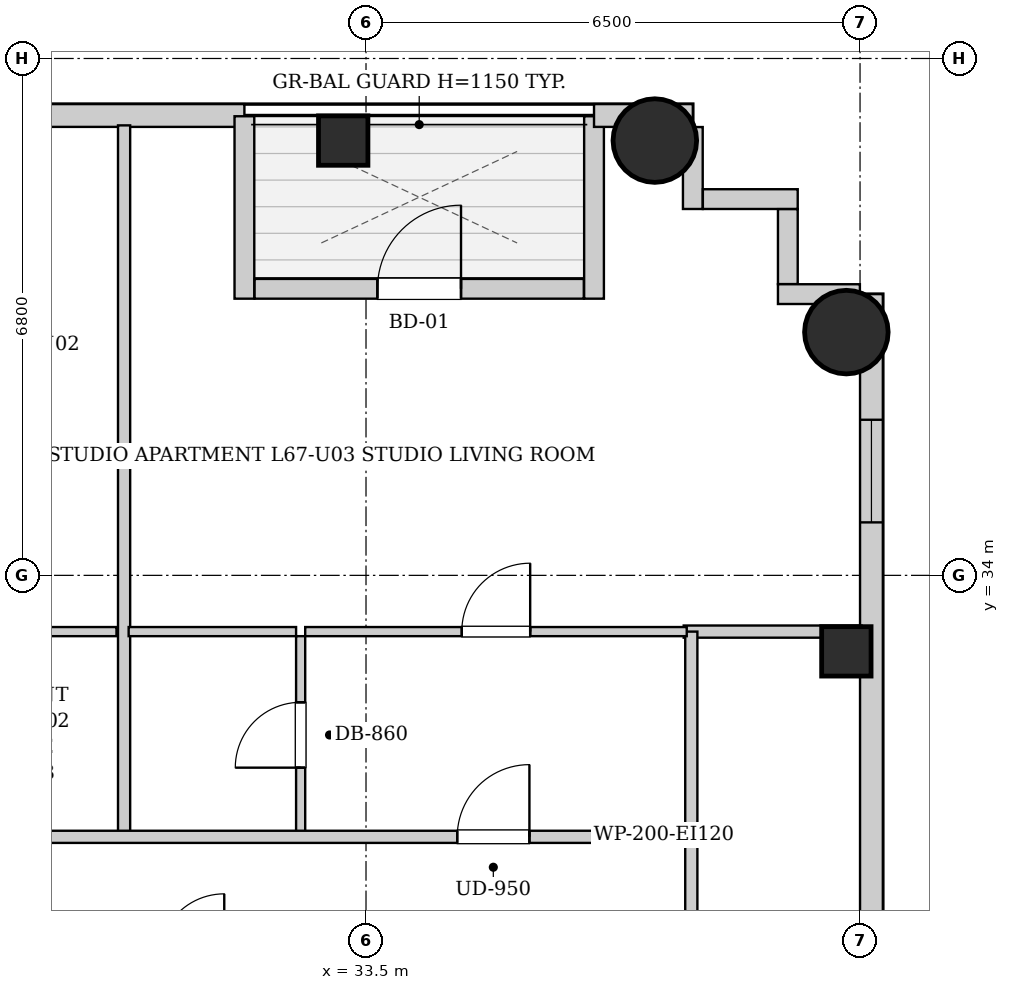
"""IFC4 building model, lengths in metres.
Left out: names, types, materials, properties, quantities, classifications, styles, units other than length and angle.
Written with IfcOpenShell. Run it as: python <this file> out.ifc"""

import sys

from ifc_helpers import new_model, si_unit, direction, frame, frame_2d, origin, origin_2d, place, context, subcontext, project, spatial, rectangle, circle, extrude, element, fill, save


model = new_model("IFC4")
c1 = context("Model", 3, precision=1e-05, world=origin(), true_north=direction((0.0, 1.0)))
c2 = subcontext(c1, "Body", "Model", "MODEL_VIEW")
j1 = project(units=[si_unit("LENGTHUNIT", "METRE"), si_unit("PLANEANGLEUNIT", "RADIAN")], contexts=[c1])
p1 = place(None, origin())
s1 = spatial("IfcSite", under=j1, at=p1, CompositionType="ELEMENT")
p2 = place(p1, origin())
s2 = spatial("IfcBuilding", under=s1, at=p2, CompositionType="ELEMENT")
p3 = place(p2, frame((0.0, 0.0, 230.9)))
s3 = spatial("IfcBuildingStorey", under=s2, at=p3, CompositionType="ELEMENT", Elevation=230.9)
p4 = place(p3, frame((33.2, 39.72, 0.0), z_axis=(0.0, 0.0, 1.0), x_axis=(1.0, 0.0, 0.0)))
e1 = element("IfcColumn", 1, at=p4, inside=s3, PredefinedType="COLUMN", context=c2, shape_type="SweptSolid", body=[
    extrude(rectangle(XDim=0.65, YDim=0.65, at=origin_2d()), origin(), (0.0, 0.0, 1.0), 3.4),
])
p5 = place(p3, frame((37.3, 39.72, 0.0), z_axis=(0.0, 0.0, 1.0), x_axis=(1.0, 0.0, 0.0)))
e2 = element("IfcColumn", 2, at=p5, inside=s3, PredefinedType="COLUMN", context=c2, shape_type="SweptSolid", body=[
    extrude(circle(Radius=0.55, at=origin_2d()), origin(), (0.0, 0.0, 1.0), 3.4),
])
p6 = place(p3, frame((39.82, 33.0, 0.0), z_axis=(0.0, 0.0, 1.0), x_axis=(1.0, 0.0, 0.0)))
e3 = element("IfcColumn", 3, at=p6, inside=s3, PredefinedType="COLUMN", context=c2, shape_type="SweptSolid", body=[
    extrude(rectangle(XDim=0.65, YDim=0.65, at=origin_2d()), origin(), (0.0, 0.0, 1.0), 3.4),
])
p7 = place(p3, frame((39.82, 37.2, 0.0), z_axis=(0.0, 0.0, 1.0), x_axis=(1.0, 0.0, 0.0)))
e4 = element("IfcColumn", 4, at=p7, inside=s3, PredefinedType="COLUMN", context=c2, shape_type="SweptSolid", body=[
    extrude(circle(Radius=0.55, at=origin_2d()), origin(), (0.0, 0.0, 1.0), 3.4),
])
p8 = place(p3, frame((13.1, 40.05, 0.0), z_axis=(0.0, 0.0, 1.0), x_axis=(1.0, 0.0, 0.0)))
e5 = element("IfcWall", 5, at=p8, inside=s3, PredefinedType="SOLIDWALL", context=c2, shape_type="SweptSolid", body=[
    extrude(rectangle(XDim=18.8, YDim=0.3, at=frame_2d((9.4, 0.0))), origin(), (0.0, 0.0, 1.0), 3.14),
])
p9 = place(p8, frame((1.806, 0.0, 0.55)))
e6 = element("IfcOpeningElement", 6, at=p9, cuts=e5, PredefinedType="OPENING", context=c2, shape_type="SweptSolid", body=[
    extrude(rectangle(XDim=1.35, YDim=1.2, at=frame_2d((0.675, 0.6))), frame((0.0, 0.16, 0.0), z_axis=(0.0, -1.0, 0.0), x_axis=(1.0, 0.0, 0.0)), (0.0, 0.0, 1.0), 0.32),
])
p10 = place(p8, frame((5.641, 0.0, 0.55)))
e7 = element("IfcOpeningElement", 7, at=p10, cuts=e5, PredefinedType="OPENING", context=c2, shape_type="SweptSolid", body=[
    extrude(rectangle(XDim=1.35, YDim=1.2, at=frame_2d((0.675, 0.6))), frame((0.0, 0.16, 0.0), z_axis=(0.0, -1.0, 0.0), x_axis=(1.0, 0.0, 0.0)), (0.0, 0.0, 1.0), 0.32),
])
p11 = place(p8, frame((8.55, 0.0, 0.55)))
e8 = element("IfcOpeningElement", 8, at=p11, cuts=e5, PredefinedType="OPENING", context=c2, shape_type="SweptSolid", body=[
    extrude(rectangle(XDim=0.85, YDim=1.2, at=frame_2d((0.425, 0.6))), frame((0.0, 0.16, 0.0), z_axis=(0.0, -1.0, 0.0), x_axis=(1.0, 0.0, 0.0)), (0.0, 0.0, 1.0), 0.32),
])
p12 = place(p8, frame((14.4, 0.0, 0.55)))
e9 = element("IfcOpeningElement", 9, at=p12, cuts=e5, PredefinedType="OPENING", context=c2, shape_type="SweptSolid", body=[
    extrude(rectangle(XDim=1.35, YDim=1.2, at=frame_2d((0.675, 0.6))), frame((0.0, 0.16, 0.0), z_axis=(0.0, -1.0, 0.0), x_axis=(1.0, 0.0, 0.0)), (0.0, 0.0, 1.0), 0.32),
])
p13 = place(p3, frame((31.9, 40.04, 0.0), z_axis=(0.0, 0.0, 1.0), x_axis=(0.0, -1.0, 0.0)))
e10 = element("IfcWall", 10, at=p13, inside=s3, PredefinedType="SOLIDWALL", context=c2, shape_type="SweptSolid", body=[
    extrude(rectangle(XDim=2.4, YDim=0.26, at=frame_2d((1.2, 0.0))), origin(), (0.0, 0.0, 1.0), 3.14),
])
p14 = place(p3, frame((32.034, 37.77, 0.0), z_axis=(0.0, 0.0, 1.0), x_axis=(1.0, 0.0, 0.0)))
e11 = element("IfcWall", 11, at=p14, inside=s3, PredefinedType="SOLIDWALL", context=c2, shape_type="SweptSolid", body=[
    extrude(rectangle(XDim=4.332, YDim=0.26, at=frame_2d((2.166, 0.0))), origin(), (0.0, 0.0, 1.0), 3.14),
])
p15 = place(p14, frame((1.616, 0.0, 0.0)))
e12 = element("IfcOpeningElement", 12, at=p15, cuts=e11, PredefinedType="OPENING", context=c2, shape_type="SweptSolid", body=[
    extrude(rectangle(XDim=1.1, YDim=2.0, at=frame_2d((0.55, 1.0))), frame((0.0, 0.14, 0.0), z_axis=(0.0, -1.0, 0.0), x_axis=(1.0, 0.0, 0.0)), (0.0, 0.0, 1.0), 0.28),
])
p16 = place(p3, frame((36.5, 37.64, 0.0), z_axis=(0.0, 0.0, 1.0), x_axis=(0.0, 1.0, 0.0)))
e13 = element("IfcWall", 13, at=p16, inside=s3, PredefinedType="SOLIDWALL", context=c2, shape_type="SweptSolid", body=[
    extrude(rectangle(XDim=2.4, YDim=0.26, at=frame_2d((1.2, 0.0))), origin(), (0.0, 0.0, 1.0), 3.14),
])
p17 = place(p3, frame((36.5, 40.05, 0.0), z_axis=(0.0, 0.0, 1.0), x_axis=(1.0, 0.0, 0.0)))
e14 = element("IfcWall", 14, at=p17, inside=s3, PredefinedType="SOLIDWALL", context=c2, shape_type="SweptSolid", body=[
    extrude(rectangle(XDim=1.3, YDim=0.3, at=frame_2d((0.65, 0.0))), origin(), (0.0, 0.0, 1.0), 3.14),
])
p18 = place(p3, frame((40.15, 37.7, 0.0), z_axis=(0.0, 0.0, 1.0), x_axis=(0.0, -1.0, 0.0)))
e15 = element("IfcWall", 15, at=p18, inside=s3, PredefinedType="SOLIDWALL", context=c2, shape_type="SweptSolid", body=[
    extrude(rectangle(XDim=31.4, YDim=0.3, at=frame_2d((15.7, 0.0))), origin(), (0.0, 0.0, 1.0), 3.14),
])
p19 = place(p18, frame((28.396, 0.0, 0.55)))
e16 = element("IfcOpeningElement", 16, at=p19, cuts=e15, PredefinedType="OPENING", context=c2, shape_type="SweptSolid", body=[
    extrude(rectangle(XDim=1.35, YDim=1.2, at=frame_2d((0.675, 0.6))), frame((0.0, 0.16, 0.0), z_axis=(0.0, -1.0, 0.0), x_axis=(1.0, 0.0, 0.0)), (0.0, 0.0, 1.0), 0.32),
])
p20 = place(p18, frame((1.653, 0.0, 0.55)))
e17 = element("IfcOpeningElement", 17, at=p20, cuts=e15, PredefinedType="OPENING", context=c2, shape_type="SweptSolid", body=[
    extrude(rectangle(XDim=1.35, YDim=1.2, at=frame_2d((0.675, 0.6))), frame((0.0, 0.16, 0.0), z_axis=(0.0, -1.0, 0.0), x_axis=(1.0, 0.0, 0.0)), (0.0, 0.0, 1.0), 0.32),
])
p21 = place(p18, frame((19.683, 0.0, 0.55)))
e18 = element("IfcOpeningElement", 18, at=p21, cuts=e15, PredefinedType="OPENING", context=c2, shape_type="SweptSolid", body=[
    extrude(rectangle(XDim=1.35, YDim=1.2, at=frame_2d((0.675, 0.6))), frame((0.0, 0.16, 0.0), z_axis=(0.0, -1.0, 0.0), x_axis=(1.0, 0.0, 0.0)), (0.0, 0.0, 1.0), 0.32),
])
p22 = place(p18, frame((10.367, 0.0, 0.55)))
e19 = element("IfcOpeningElement", 19, at=p22, cuts=e15, PredefinedType="OPENING", context=c2, shape_type="SweptSolid", body=[
    extrude(rectangle(XDim=1.35, YDim=1.2, at=frame_2d((0.675, 0.6))), frame((0.0, 0.16, 0.0), z_axis=(0.0, -1.0, 0.0), x_axis=(1.0, 0.0, 0.0)), (0.0, 0.0, 1.0), 0.32),
])
p23 = place(p3, frame((37.8, 39.898, 0.0), z_axis=(0.0, 0.0, 1.0), x_axis=(0.0, -1.0, 0.0)))
e20 = element("IfcWall", 20, at=p23, inside=s3, PredefinedType="SOLIDWALL", context=c2, shape_type="SweptSolid", body=[
    extrude(rectangle(XDim=1.078, YDim=0.26, at=frame_2d((0.539, 0.0))), origin(), (0.0, 0.0, 1.0), 3.14),
])
p24 = place(p3, frame((37.932, 38.95, 0.0), z_axis=(0.0, 0.0, 1.0), x_axis=(1.0, 0.0, 0.0)))
e21 = element("IfcWall", 21, at=p24, inside=s3, PredefinedType="SOLIDWALL", context=c2, shape_type="SweptSolid", body=[
    extrude(rectangle(XDim=1.248, YDim=0.26, at=frame_2d((0.624, 0.0))), origin(), (0.0, 0.0, 1.0), 3.14),
])
p25 = place(p3, frame((39.05, 38.818, 0.0), z_axis=(0.0, 0.0, 1.0), x_axis=(0.0, -1.0, 0.0)))
e22 = element("IfcWall", 22, at=p25, inside=s3, PredefinedType="SOLIDWALL", context=c2, shape_type="SweptSolid", body=[
    extrude(rectangle(XDim=0.986, YDim=0.26, at=frame_2d((0.493, 0.0))), origin(), (0.0, 0.0, 1.0), 3.14),
])
p26 = place(p3, frame((38.92, 37.7, 0.0), z_axis=(0.0, 0.0, 1.0), x_axis=(1.0, 0.0, 0.0)))
e23 = element("IfcWall", 23, at=p26, inside=s3, PredefinedType="SOLIDWALL", context=c2, shape_type="SweptSolid", body=[
    extrude(rectangle(XDim=1.078, YDim=0.26, at=frame_2d((0.539, 0.0))), origin(), (0.0, 0.0, 1.0), 3.14),
])
p27 = place(p3, frame((37.78, 28.98, 0.0), z_axis=(0.0, 0.0, 1.0), x_axis=(0.0, 1.0, 0.0)))
e24 = element("IfcWall", 24, at=p27, inside=s3, PredefinedType="PARTITIONING", context=c2, shape_type="SweptSolid", body=[
    extrude(rectangle(XDim=1.58, YDim=0.16, at=frame_2d((0.79, 0.0))), origin(), (0.0, 0.0, 1.0), 3.14),
])
p28 = place(p3, frame((27.25, 33.26, 0.0), z_axis=(0.0, 0.0, 1.0), x_axis=(1.0, 0.0, 0.0)))
e25 = element("IfcWall", 25, at=p28, inside=s3, PredefinedType="PARTITIONING", context=c2, shape_type="SweptSolid", body=[
    extrude(rectangle(XDim=2.967, YDim=0.12, at=frame_2d((1.483, 0.0))), origin(), (0.0, 0.0, 1.0), 3.14),
])
p29 = place(p28, frame((1.033, 0.0, 0.0)))
e26 = element("IfcOpeningElement", 26, at=p29, cuts=e25, PredefinedType="OPENING", context=c2, shape_type="SweptSolid", body=[
    extrude(rectangle(XDim=0.9, YDim=2.05, at=frame_2d((0.45, 1.025))), frame((0.0, 0.07, 0.0), z_axis=(0.0, -1.0, 0.0), x_axis=(1.0, 0.0, 0.0)), (0.0, 0.0, 1.0), 0.14),
])
p30 = place(p3, frame((37.68, 33.26, 0.0), z_axis=(0.0, 0.0, 1.0), x_axis=(1.0, 0.0, 0.0)))
e27 = element("IfcWall", 27, at=p30, inside=s3, PredefinedType="PARTITIONING", context=c2, shape_type="SweptSolid", body=[
    extrude(rectangle(XDim=2.34, YDim=0.16, at=frame_2d((1.17, 0.0))), origin(), (0.0, 0.0, 1.0), 3.14),
])
p31 = place(p3, frame((37.78, 30.6, 0.0), z_axis=(0.0, 0.0, 1.0), x_axis=(0.0, 1.0, 0.0)))
e28 = element("IfcWall", 28, at=p31, inside=s3, PredefinedType="PARTITIONING", context=c2, shape_type="SweptSolid", body=[
    extrude(rectangle(XDim=2.66, YDim=0.16, at=frame_2d((1.33, 0.0))), origin(), (0.0, 0.0, 1.0), 3.14),
])
p32 = place(p3, frame((30.317, 30.6, 0.0), z_axis=(0.0, 0.0, 1.0), x_axis=(0.0, 1.0, 0.0)))
e29 = element("IfcWall", 29, at=p32, inside=s3, PredefinedType="PARTITIONING", context=c2, shape_type="SweptSolid", body=[
    extrude(rectangle(XDim=9.32, YDim=0.16, at=frame_2d((4.66, 0.0))), origin(), (0.0, 0.0, 1.0), 3.14),
])
p33 = place(p3, frame((32.64, 30.6, 0.0), z_axis=(0.0, 0.0, 1.0), x_axis=(0.0, 1.0, 0.0)))
e30 = element("IfcWall", 30, at=p33, inside=s3, PredefinedType="PARTITIONING", context=c2, shape_type="SweptSolid", body=[
    extrude(rectangle(XDim=2.6, YDim=0.12, at=frame_2d((1.3, 0.0))), origin(), (0.0, 0.0, 1.0), 3.14),
])
p34 = place(p33, frame((0.87, 0.0, 0.0)))
e31 = element("IfcOpeningElement", 31, at=p34, cuts=e30, PredefinedType="OPENING", context=c2, shape_type="SweptSolid", body=[
    extrude(rectangle(XDim=0.86, YDim=2.05, at=frame_2d((0.43, 1.025))), frame((0.0, 0.07, 0.0), z_axis=(0.0, -1.0, 0.0), x_axis=(1.0, 0.0, 0.0)), (0.0, 0.0, 1.0), 0.14),
])
p35 = place(p3, frame((30.377, 33.26, 0.0), z_axis=(0.0, 0.0, 1.0), x_axis=(1.0, 0.0, 0.0)))
e32 = element("IfcWall", 32, at=p35, inside=s3, PredefinedType="PARTITIONING", context=c2, shape_type="SweptSolid", body=[
    extrude(rectangle(XDim=2.203, YDim=0.12, at=frame_2d((1.102, 0.0))), origin(), (0.0, 0.0, 1.0), 3.14),
])
p36 = place(p3, frame((32.7, 33.26, 0.0), z_axis=(0.0, 0.0, 1.0), x_axis=(1.0, 0.0, 0.0)))
e33 = element("IfcWall", 33, at=p36, inside=s3, PredefinedType="PARTITIONING", context=c2, shape_type="SweptSolid", body=[
    extrude(rectangle(XDim=5.02, YDim=0.12, at=frame_2d((2.51, 0.0))), origin(), (0.0, 0.0, 1.0), 3.14),
])
p37 = place(p36, frame((2.06, 0.0, 0.0)))
e34 = element("IfcOpeningElement", 34, at=p37, cuts=e33, PredefinedType="OPENING", context=c2, shape_type="SweptSolid", body=[
    extrude(rectangle(XDim=0.9, YDim=2.05, at=frame_2d((0.45, 1.025))), frame((0.0, 0.07, 0.0), z_axis=(0.0, -1.0, 0.0), x_axis=(1.0, 0.0, 0.0)), (0.0, 0.0, 1.0), 0.14),
])
p38 = place(p3, frame((13.15, 30.56, 0.0), z_axis=(0.0, 0.0, 1.0), x_axis=(1.0, 0.0, 0.0)))
e35 = element("IfcWall", 35, at=p38, inside=s3, PredefinedType="PARTITIONING", context=c2, shape_type="SweptSolid", body=[
    extrude(rectangle(XDim=24.6, YDim=0.16, at=frame_2d((12.3, 0.0))), origin(), (0.0, 0.0, 1.0), 3.14),
])
p39 = place(p38, frame((5.185, 0.0, 0.0)))
e36 = element("IfcOpeningElement", 36, at=p39, cuts=e35, PredefinedType="OPENING", context=c2, shape_type="SweptSolid", body=[
    extrude(rectangle(XDim=0.95, YDim=2.1, at=frame_2d((0.475, 1.05))), frame((0.0, 0.09, 0.0), z_axis=(0.0, -1.0, 0.0), x_axis=(1.0, 0.0, 0.0)), (0.0, 0.0, 1.0), 0.18),
])
p40 = place(p38, frame((21.55, 0.0, 0.0)))
e37 = element("IfcOpeningElement", 37, at=p40, cuts=e35, PredefinedType="OPENING", context=c2, shape_type="SweptSolid", body=[
    extrude(rectangle(XDim=0.95, YDim=2.1, at=frame_2d((0.475, 1.05))), frame((0.0, 0.09, 0.0), z_axis=(0.0, -1.0, 0.0), x_axis=(1.0, 0.0, 0.0)), (0.0, 0.0, 1.0), 0.18),
])
p41 = place(p34, origin())
e38 = element("IfcDoor", 38, at=p41, inside=s3, OperationType="SINGLE_SWING_LEFT", PredefinedType="DOOR", context=c2, shape_type="SweptSolid", body=[
    extrude(rectangle(XDim=0.86, YDim=2.05, at=frame_2d((0.43, 1.025))), frame((0.0, 0.025, 0.0), z_axis=(0.0, -1.0, 0.0), x_axis=(1.0, 0.0, 0.0)), (0.0, 0.0, 1.0), 0.05),
])
fill(e31, e38)
p42 = place(p37, origin())
e39 = element("IfcDoor", 39, at=p42, inside=s3, OperationType="SINGLE_SWING_RIGHT", PredefinedType="DOOR", context=c2, shape_type="SweptSolid", body=[
    extrude(rectangle(XDim=0.9, YDim=2.05, at=frame_2d((0.45, 1.025))), frame((0.0, 0.025, 0.0), z_axis=(0.0, -1.0, 0.0), x_axis=(1.0, 0.0, 0.0)), (0.0, 0.0, 1.0), 0.05),
])
fill(e34, e39)
p43 = place(p40, origin())
e40 = element("IfcDoor", 40, at=p43, inside=s3, OperationType="SINGLE_SWING_RIGHT", PredefinedType="DOOR", context=c2, shape_type="SweptSolid", body=[
    extrude(rectangle(XDim=0.95, YDim=2.1, at=frame_2d((0.475, 1.05))), frame((0.0, 0.025, 0.0), z_axis=(0.0, -1.0, 0.0), x_axis=(1.0, 0.0, 0.0)), (0.0, 0.0, 1.0), 0.05),
])
fill(e37, e40)
p44 = place(p15, origin())
e41 = element("IfcDoor", 41, at=p44, inside=s3, OperationType="SINGLE_SWING_RIGHT", PredefinedType="DOOR", context=c2, shape_type="SweptSolid", body=[
    extrude(rectangle(XDim=1.1, YDim=2.0, at=frame_2d((0.55, 1.0))), frame((0.0, 0.025, 0.0), z_axis=(0.0, -1.0, 0.0), x_axis=(1.0, 0.0, 0.0)), (0.0, 0.0, 1.0), 0.05),
])
fill(e12, e41)
p45 = place(p20, origin())
e42 = element("IfcWindow", 42, at=p45, inside=s3, PartitioningType="SINGLE_PANEL", PredefinedType="WINDOW", context=c2, shape_type="SweptSolid", body=[
    extrude(rectangle(XDim=1.35, YDim=1.2, at=frame_2d((0.675, 0.6))), frame((0.0, 0.03, 0.0), z_axis=(0.0, -1.0, 0.0), x_axis=(1.0, 0.0, 0.0)), (0.0, 0.0, 1.0), 0.06),
])
fill(e17, e42)
save(model, sys.argv[1])
